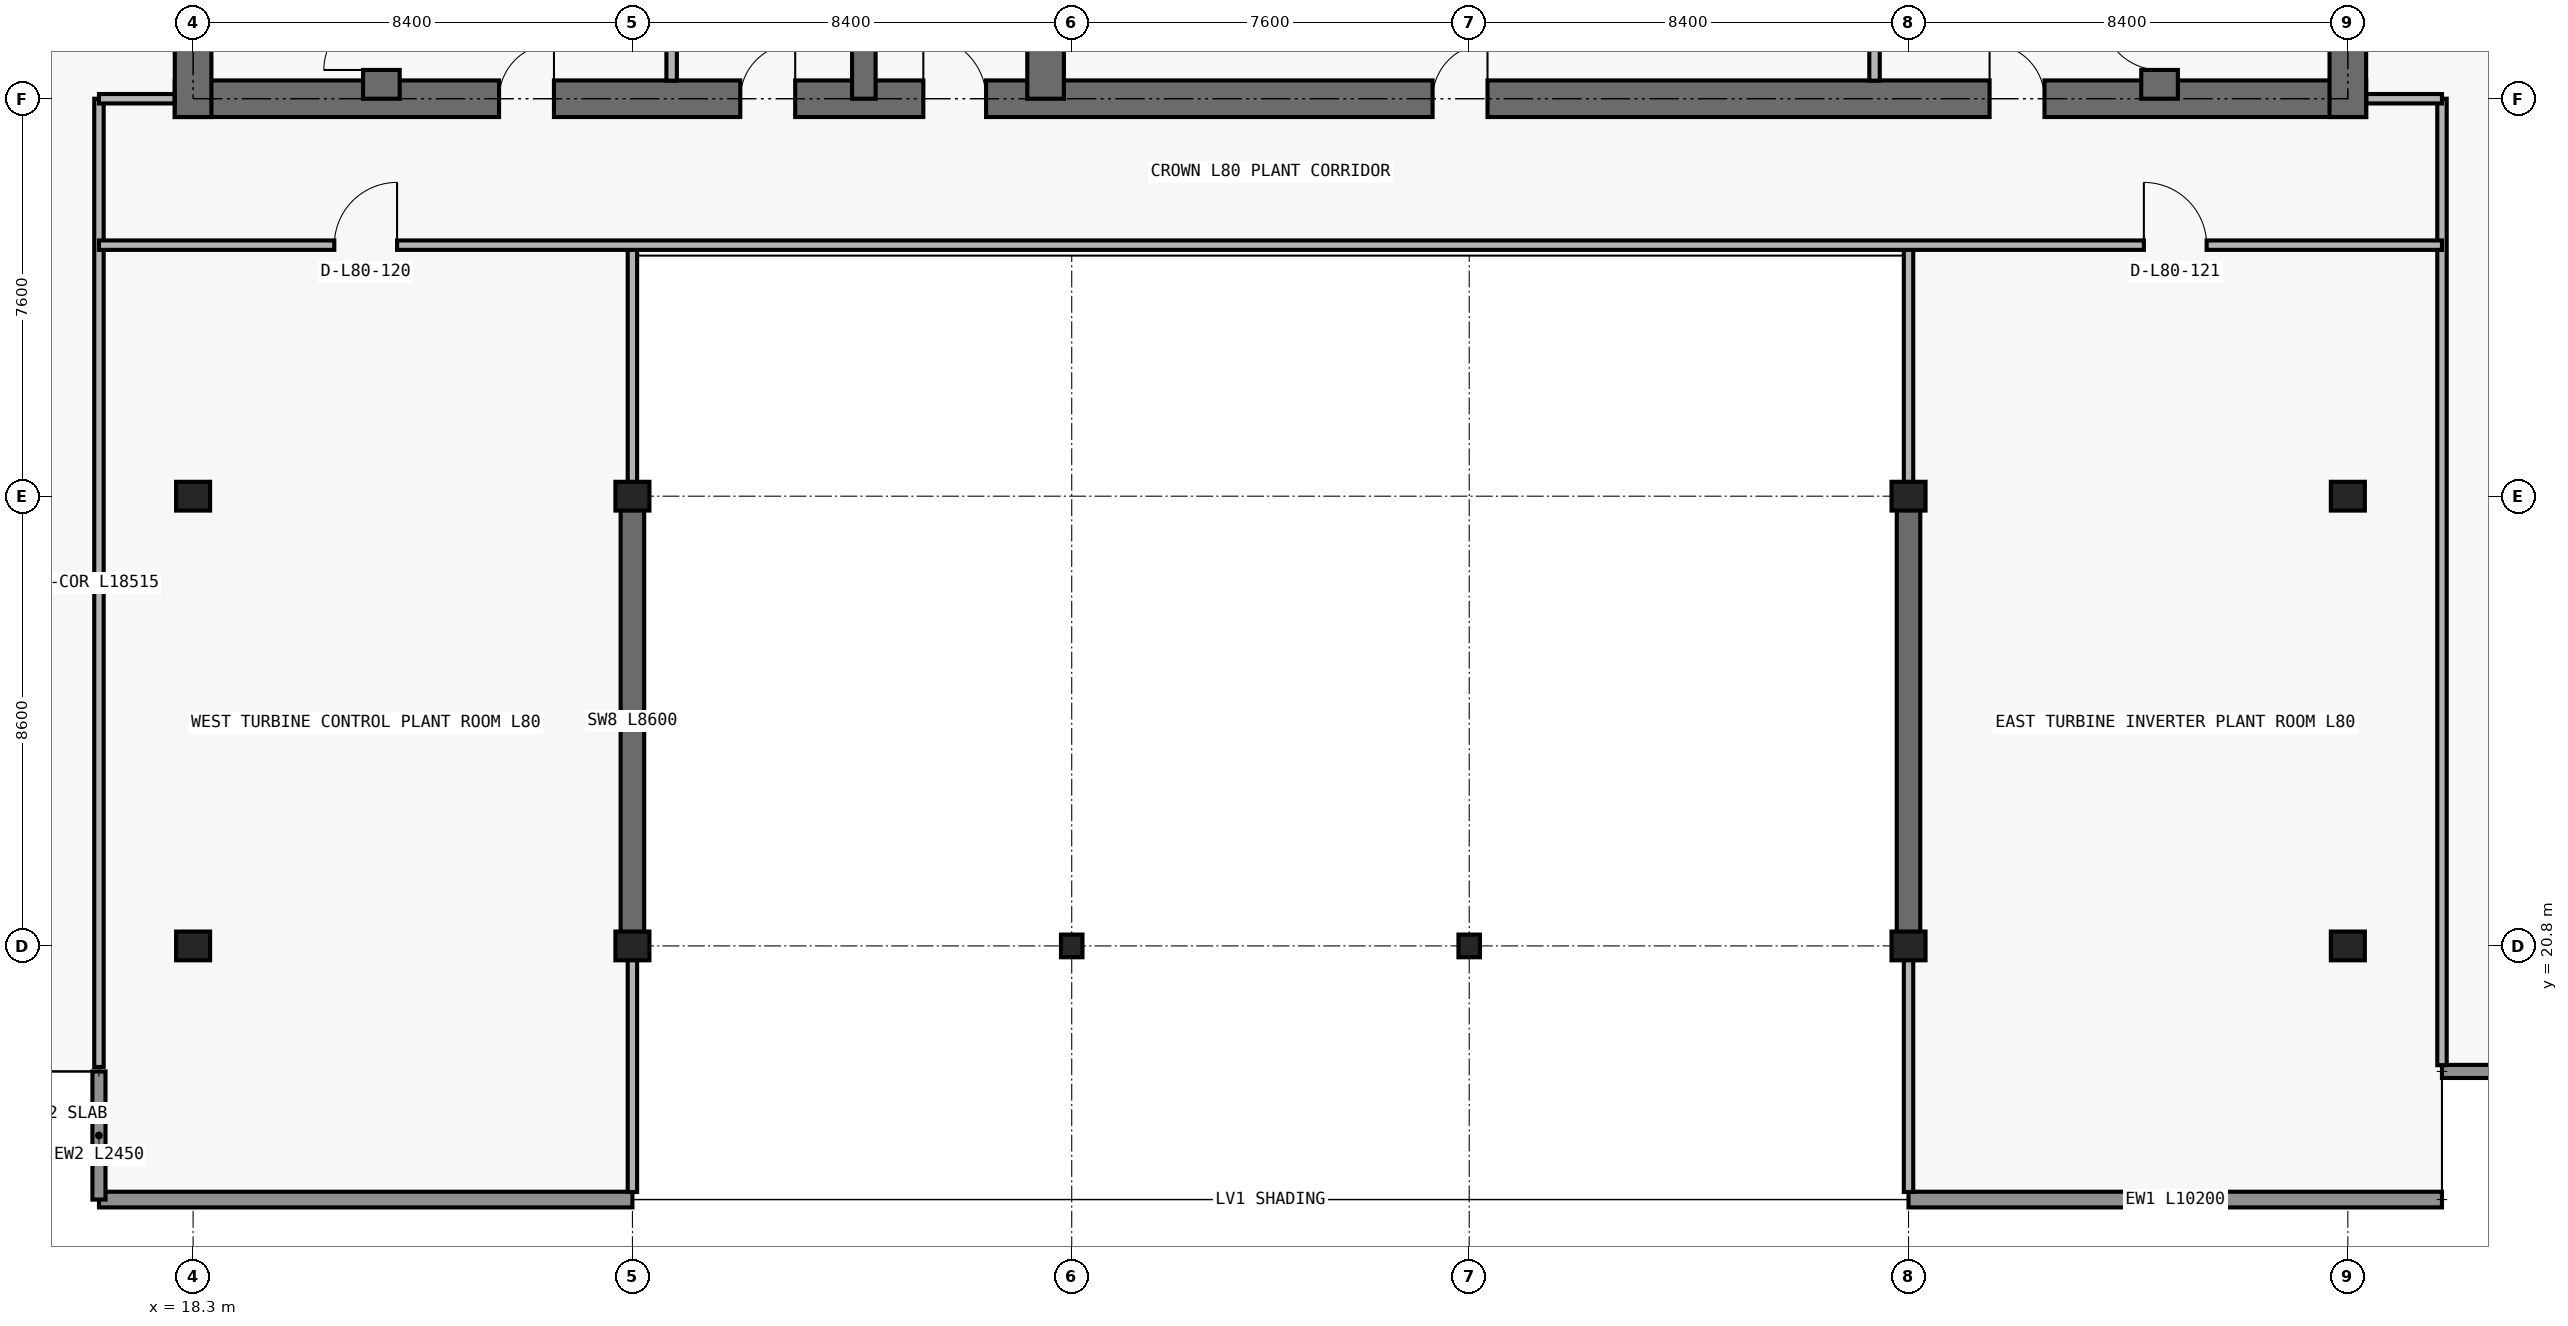
"""IFC4 building model, lengths in metres.
Left out: names, types, materials, properties, quantities, classifications, styles, units other than length and angle.
Written with IfcOpenShell. Run it as: python <this file> out.ifc"""

import sys

from ifc_helpers import new_model, si_unit, direction, frame, frame_2d, origin, origin_2d, place, context, subcontext, project, spatial, rectangle, i_section, extrude, element, fill, save


model = new_model("IFC4")
c1 = context("Model", 3, precision=1e-05, world=origin(), true_north=direction((0.0, 1.0)))
c2 = subcontext(c1, "Body", "Model", "MODEL_VIEW")
j1 = project(units=[si_unit("LENGTHUNIT", "METRE"), si_unit("PLANEANGLEUNIT", "RADIAN")], contexts=[c1])
p1 = place(None, origin())
s1 = spatial("IfcSite", under=j1, at=p1, CompositionType="ELEMENT")
p2 = place(p1, origin())
s2 = spatial("IfcBuilding", under=s1, at=p2, CompositionType="ELEMENT")
p3 = place(p2, frame((0.0, 0.0, 290.2)))
s3 = spatial("IfcBuildingStorey", under=s2, at=p3, CompositionType="ELEMENT", Elevation=290.2)
for number, where, z_axis, x_axis in (
    (1, (18.3, 20.8, 0.0), (0.0, 0.0, 1.0), (1.0, 0.0, 0.0)),
    (2, (26.7, 20.8, 0.0), (0.0, 0.0, 1.0), (1.0, 0.0, 0.0)),
    (3, (51.1, 20.8, 0.0), (0.0, 0.0, 1.0), (1.0, 0.0, 0.0)),
    (4, (59.5, 20.8, 0.0), (0.0, 0.0, 1.0), (1.0, 0.0, 0.0)),
    (5, (18.3, 29.4, 0.0), (0.0, 0.0, 1.0), (1.0, 0.0, 0.0)),
    (6, (26.7, 29.4, 0.0), (0.0, 0.0, 1.0), (1.0, 0.0, 0.0)),
    (7, (51.1, 29.4, 0.0), (0.0, 0.0, 1.0), (1.0, 0.0, 0.0)),
    (8, (59.5, 29.4, 0.0), (0.0, 0.0, 1.0), (1.0, 0.0, 0.0)),
):
    element("IfcColumn", number, at=place(p3, frame(where, z_axis=z_axis, x_axis=x_axis)), inside=s3, PredefinedType="COLUMN", context=c2, shape_type="SweptSolid", body=[
        extrude(rectangle(XDim=0.65, YDim=0.55, at=origin_2d()), origin(), (0.0, 0.0, 1.0), 5.1),
    ])
for number, where, z_axis, x_axis in (
    (9, (35.1, 20.8, 0.0), (0.0, 0.0, 1.0), (1.0, 0.0, 0.0)),
    (10, (42.7, 20.8, 0.0), (0.0, 0.0, 1.0), (1.0, 0.0, 0.0)),
):
    element("IfcColumn", number, at=place(p3, frame(where, z_axis=z_axis, x_axis=x_axis)), inside=s3, PredefinedType="COLUMN", context=c2, shape_type="SweptSolid", body=[
        extrude(i_section(OverallWidth=0.411, OverallDepth=0.434, WebThickness=0.036, FlangeThickness=0.057, FilletRadius=0.015, at=origin_2d()), origin(), (0.0, 0.0, 1.0), 5.1),
    ])
p4 = place(p3, frame((17.95, 37.0, 0.0), z_axis=(0.0, 0.0, 1.0), x_axis=(1.0, 0.0, 0.0)))
e11 = element("IfcWall", 11, at=p4, inside=s3, PredefinedType="SHEAR", context=c2, shape_type="SweptSolid", body=[
    extrude(rectangle(XDim=41.9, YDim=0.7, at=frame_2d((20.95, 0.0))), origin(), (0.0, 0.0, 1.0), 5.1),
])
p5 = place(p4, frame((14.312, 0.0, 0.0)))
e12 = element("IfcOpeningElement", 12, at=p5, cuts=e11, PredefinedType="OPENING", context=c2, shape_type="SweptSolid", body=[
    extrude(rectangle(XDim=1.2, YDim=2.2, at=frame_2d((0.6, 1.1))), frame((0.0, 0.36, 0.0), z_axis=(0.0, -1.0, 0.0), x_axis=(1.0, 0.0, 0.0)), (0.0, 0.0, 1.0), 0.72),
])
p6 = place(p4, frame((6.2, 0.0, 0.0)))
e13 = element("IfcOpeningElement", 13, at=p6, cuts=e11, PredefinedType="OPENING", context=c2, shape_type="SweptSolid", body=[
    extrude(rectangle(XDim=1.05, YDim=2.15, at=frame_2d((0.525, 1.075))), frame((0.0, 0.36, 0.0), z_axis=(0.0, -1.0, 0.0), x_axis=(1.0, 0.0, 0.0)), (0.0, 0.0, 1.0), 0.72),
])
p7 = place(p4, frame((34.7, 0.0, 0.0)))
e14 = element("IfcOpeningElement", 14, at=p7, cuts=e11, PredefinedType="OPENING", context=c2, shape_type="SweptSolid", body=[
    extrude(rectangle(XDim=1.05, YDim=2.15, at=frame_2d((0.525, 1.075))), frame((0.0, 0.36, 0.0), z_axis=(0.0, -1.0, 0.0), x_axis=(1.0, 0.0, 0.0)), (0.0, 0.0, 1.0), 0.72),
])
p8 = place(p4, frame((10.812, 0.0, 0.0)))
e15 = element("IfcOpeningElement", 15, at=p8, cuts=e11, PredefinedType="OPENING", context=c2, shape_type="SweptSolid", body=[
    extrude(rectangle(XDim=1.05, YDim=2.15, at=frame_2d((0.525, 1.075))), frame((0.0, 0.36, 0.0), z_axis=(0.0, -1.0, 0.0), x_axis=(1.0, 0.0, 0.0)), (0.0, 0.0, 1.0), 0.72),
])
p9 = place(p4, frame((24.05, 0.0, 0.0)))
e16 = element("IfcOpeningElement", 16, at=p9, cuts=e11, PredefinedType="OPENING", context=c2, shape_type="SweptSolid", body=[
    extrude(rectangle(XDim=1.05, YDim=2.15, at=frame_2d((0.525, 1.075))), frame((0.0, 0.36, 0.0), z_axis=(0.0, -1.0, 0.0), x_axis=(1.0, 0.0, 0.0)), (0.0, 0.0, 1.0), 0.72),
])
for number, where, z_axis, x_axis in (
    (17, (18.3, 36.65, 0.0), (0.0, 0.0, 1.0), (0.0, 1.0, 0.0)),
    (18, (59.5, 36.65, 0.0), (0.0, 0.0, 1.0), (0.0, 1.0, 0.0)),
):
    element("IfcWall", number, at=place(p3, frame(where, z_axis=z_axis, x_axis=x_axis)), inside=s3, PredefinedType="SHEAR", context=c2, shape_type="SweptSolid", body=[
        extrude(rectangle(XDim=13.95, YDim=0.7, at=frame_2d((6.975, 0.0))), origin(), (0.0, 0.0, 1.0), 5.1),
    ])
p10 = place(p3, frame((21.9, 37.0, 0.0), z_axis=(0.0, 0.0, 1.0), x_axis=(0.0, 1.0, 0.0)))
e19 = element("IfcWall", 19, at=p10, inside=s3, PredefinedType="SHEAR", context=c2, shape_type="SweptSolid", body=[
    extrude(rectangle(XDim=9.575, YDim=0.7, at=frame_2d((4.788, 0.0))), origin(), (0.0, 0.0, 1.0), 5.1),
])
p11 = place(p10, frame((0.55, 0.0, 0.0)))
e20 = element("IfcOpeningElement", 20, at=p11, cuts=e19, PredefinedType="OPENING", context=c2, shape_type="SweptSolid", body=[
    extrude(rectangle(XDim=1.1, YDim=2.15, at=frame_2d((0.55, 1.075))), frame((0.0, 0.36, 0.0), z_axis=(0.0, -1.0, 0.0), x_axis=(1.0, 0.0, 0.0)), (0.0, 0.0, 1.0), 0.72),
])
p12 = place(p3, frame((55.9, 37.0, 0.0), z_axis=(0.0, 0.0, 1.0), x_axis=(0.0, 1.0, 0.0)))
e21 = element("IfcWall", 21, at=p12, inside=s3, PredefinedType="SHEAR", context=c2, shape_type="SweptSolid", body=[
    extrude(rectangle(XDim=9.575, YDim=0.7, at=frame_2d((4.788, 0.0))), origin(), (0.0, 0.0, 1.0), 5.1),
])
p13 = place(p12, frame((0.55, 0.0, 0.0)))
e22 = element("IfcOpeningElement", 22, at=p13, cuts=e21, PredefinedType="OPENING", context=c2, shape_type="SweptSolid", body=[
    extrude(rectangle(XDim=1.1, YDim=2.15, at=frame_2d((0.55, 1.075))), frame((0.0, 0.36, 0.0), z_axis=(0.0, -1.0, 0.0), x_axis=(1.0, 0.0, 0.0)), (0.0, 0.0, 1.0), 0.72),
])
p14 = place(p3, frame((31.125, 37.0, 0.0), z_axis=(0.0, 0.0, 1.0), x_axis=(0.0, 1.0, 0.0)))
e23 = element("IfcWall", 23, at=p14, inside=s3, PredefinedType="SHEAR", context=c2, shape_type="SweptSolid", body=[
    extrude(rectangle(XDim=9.575, YDim=0.45, at=frame_2d((4.788, 0.0))), origin(), (0.0, 0.0, 1.0), 5.1),
])
p15 = place(p3, frame((34.6, 37.0, 0.0), z_axis=(0.0, 0.0, 1.0), x_axis=(0.0, 1.0, 0.0)))
e24 = element("IfcWall", 24, at=p15, inside=s3, PredefinedType="SHEAR", context=c2, shape_type="SweptSolid", body=[
    extrude(rectangle(XDim=9.575, YDim=0.7, at=frame_2d((4.788, 0.0))), origin(), (0.0, 0.0, 1.0), 5.1),
])
for number, where, z_axis, x_axis in (
    (25, (26.7, 20.8, 0.0), (0.0, 0.0, 1.0), (0.0, 1.0, 0.0)),
    (26, (51.1, 20.8, 0.0), (0.0, 0.0, 1.0), (0.0, 1.0, 0.0)),
):
    element("IfcWall", number, at=place(p3, frame(where, z_axis=z_axis, x_axis=x_axis)), inside=s3, PredefinedType="SHEAR", context=c2, shape_type="SweptSolid", body=[
        extrude(rectangle(XDim=8.6, YDim=0.45, at=frame_2d((4.3, 0.0))), origin(), (0.0, 0.0, 1.0), 5.1),
    ])
for number, where, z_axis, x_axis in (
    (27, (61.3, 15.95, 0.0), (0.0, 0.0, 1.0), (-1.0, 0.0, 0.0)),
    (28, (26.7, 15.95, 0.0), (0.0, 0.0, 1.0), (-1.0, 0.0, 0.0)),
):
    element("IfcWall", number, at=place(p3, frame(where, z_axis=z_axis, x_axis=x_axis)), inside=s3, PredefinedType="STANDARD", context=c2, shape_type="SweptSolid", body=[
        extrude(rectangle(XDim=10.2, YDim=0.3, at=frame_2d((5.1, 0.0))), origin(), (0.0, 0.0, 1.0), 5.1),
    ])
p16 = place(p3, frame((16.5, 18.4, 0.0), z_axis=(0.0, 0.0, 1.0), x_axis=(0.0, -1.0, 0.0)))
e29 = element("IfcWall", 29, at=p16, inside=s3, PredefinedType="ELEMENTEDWALL", context=c2, shape_type="SweptSolid", body=[
    extrude(rectangle(XDim=2.45, YDim=0.25, at=frame_2d((1.225, 0.0))), origin(), (0.0, 0.0, 1.0), 5.1),
])
p17 = place(p3, frame((61.3, 18.4, 0.0), z_axis=(0.0, 0.0, 1.0), x_axis=(1.0, 0.0, 0.0)))
e30 = element("IfcWall", 30, at=p17, inside=s3, PredefinedType="ELEMENTEDWALL", context=c2, shape_type="SweptSolid", body=[
    extrude(rectangle(XDim=2.65, YDim=0.25, at=frame_2d((1.325, 0.0))), origin(), (0.0, 0.0, 1.0), 5.1),
])
p18 = place(p3, frame((16.5, 18.485, 0.0), z_axis=(0.0, 0.0, 1.0), x_axis=(0.0, 1.0, 0.0)))
e31 = element("IfcWall", 31, at=p18, inside=s3, PredefinedType="PARTITIONING", context=c2, shape_type="SweptSolid", body=[
    extrude(rectangle(XDim=18.515, YDim=0.18, at=frame_2d((9.257, 0.0))), origin(), (0.0, 0.0, 1.0), 5.1),
])
p19 = place(p3, frame((26.7, 16.095, 0.0), z_axis=(0.0, 0.0, 1.0), x_axis=(0.0, 1.0, 0.0)))
e32 = element("IfcWall", 32, at=p19, inside=s3, PredefinedType="PARTITIONING", context=c2, shape_type="SweptSolid", body=[
    extrude(rectangle(XDim=4.7, YDim=0.18, at=frame_2d((2.35, 0.0))), origin(), (0.0, 0.0, 1.0), 5.1),
])
p20 = place(p3, frame((26.7, 29.405, 0.0), z_axis=(0.0, 0.0, 1.0), x_axis=(0.0, 1.0, 0.0)))
e33 = element("IfcWall", 33, at=p20, inside=s3, PredefinedType="PARTITIONING", context=c2, shape_type="SweptSolid", body=[
    extrude(rectangle(XDim=4.795, YDim=0.18, at=frame_2d((2.397, 0.0))), origin(), (0.0, 0.0, 1.0), 4.385),
])
for number, where, z_axis, x_axis in (
    (34, (27.45, 37.345, 0.0), (0.0, 0.0, 1.0), (0.0, 1.0, 0.0)),
    (35, (50.45, 37.345, 0.0), (0.0, 0.0, 1.0), (0.0, 1.0, 0.0)),
):
    element("IfcWall", number, at=place(p3, frame(where, z_axis=z_axis, x_axis=x_axis)), inside=s3, PredefinedType="PARTITIONING", context=c2, shape_type="SweptSolid", body=[
        extrude(rectangle(XDim=5.385, YDim=0.2, at=frame_2d((2.692, 0.0))), origin(), (0.0, 0.0, 1.0), 5.1),
    ])
p21 = place(p3, frame((51.1, 16.095, 0.0), z_axis=(0.0, 0.0, 1.0), x_axis=(0.0, 1.0, 0.0)))
e36 = element("IfcWall", 36, at=p21, inside=s3, PredefinedType="PARTITIONING", context=c2, shape_type="SweptSolid", body=[
    extrude(rectangle(XDim=4.7, YDim=0.18, at=frame_2d((2.35, 0.0))), origin(), (0.0, 0.0, 1.0), 5.1),
])
p22 = place(p3, frame((51.1, 29.405, 0.0), z_axis=(0.0, 0.0, 1.0), x_axis=(0.0, 1.0, 0.0)))
e37 = element("IfcWall", 37, at=p22, inside=s3, PredefinedType="PARTITIONING", context=c2, shape_type="SweptSolid", body=[
    extrude(rectangle(XDim=4.795, YDim=0.18, at=frame_2d((2.397, 0.0))), origin(), (0.0, 0.0, 1.0), 4.385),
])
p23 = place(p3, frame((61.3, 18.52, 0.0), z_axis=(0.0, 0.0, 1.0), x_axis=(0.0, 1.0, 0.0)))
e38 = element("IfcWall", 38, at=p23, inside=s3, PredefinedType="PARTITIONING", context=c2, shape_type="SweptSolid", body=[
    extrude(rectangle(XDim=18.48, YDim=0.18, at=frame_2d((9.24, 0.0))), origin(), (0.0, 0.0, 1.0), 5.1),
])
p24 = place(p3, frame((16.5, 34.2, 0.0), z_axis=(0.0, 0.0, 1.0), x_axis=(1.0, 0.0, 0.0)))
e39 = element("IfcWall", 39, at=p24, inside=s3, PredefinedType="PARTITIONING", context=c2, shape_type="SweptSolid", body=[
    extrude(rectangle(XDim=44.8, YDim=0.18, at=frame_2d((22.4, 0.0))), origin(), (0.0, 0.0, 1.0), 5.1),
])
p25 = place(p24, frame((4.5, 0.0, 0.0)))
e40 = element("IfcOpeningElement", 40, at=p25, cuts=e39, PredefinedType="OPENING", context=c2, shape_type="SweptSolid", body=[
    extrude(rectangle(XDim=1.2, YDim=2.2, at=frame_2d((0.6, 1.1))), frame((0.0, 0.1, 0.0), z_axis=(0.0, -1.0, 0.0), x_axis=(1.0, 0.0, 0.0)), (0.0, 0.0, 1.0), 0.2),
])
p26 = place(p24, frame((39.1, 0.0, 0.0)))
e41 = element("IfcOpeningElement", 41, at=p26, cuts=e39, PredefinedType="OPENING", context=c2, shape_type="SweptSolid", body=[
    extrude(rectangle(XDim=1.2, YDim=2.2, at=frame_2d((0.6, 1.1))), frame((0.0, 0.1, 0.0), z_axis=(0.0, -1.0, 0.0), x_axis=(1.0, 0.0, 0.0)), (0.0, 0.0, 1.0), 0.2),
])
for number, where, z_axis, x_axis in (
    (42, (16.5, 37.0, 0.0), (0.0, 0.0, 1.0), (1.0, 0.0, 0.0)),
    (43, (59.855, 37.0, 0.0), (0.0, 0.0, 1.0), (1.0, 0.0, 0.0)),
):
    element("IfcWall", number, at=place(p3, frame(where, z_axis=z_axis, x_axis=x_axis)), inside=s3, PredefinedType="PARTITIONING", context=c2, shape_type="SweptSolid", body=[
        extrude(rectangle(XDim=1.445, YDim=0.18, at=frame_2d((0.723, 0.0))), origin(), (0.0, 0.0, 1.0), 5.1),
    ])
p27 = place(p5, origin())
e44 = element("IfcDoor", 44, at=p27, inside=s3, OperationType="SINGLE_SWING_LEFT", PredefinedType="DOOR", context=c2, shape_type="SweptSolid", body=[
    extrude(rectangle(XDim=1.2, YDim=2.2, at=frame_2d((0.6, 1.1))), frame((0.0, 0.025, 0.0), z_axis=(0.0, -1.0, 0.0), x_axis=(1.0, 0.0, 0.0)), (0.0, 0.0, 1.0), 0.05),
])
fill(e12, e44)
p28 = place(p6, origin())
e45 = element("IfcDoor", 45, at=p28, inside=s3, OperationType="SINGLE_SWING_RIGHT", PredefinedType="DOOR", context=c2, shape_type="SweptSolid", body=[
    extrude(rectangle(XDim=1.05, YDim=2.15, at=frame_2d((0.525, 1.075))), frame((0.0, 0.025, 0.0), z_axis=(0.0, -1.0, 0.0), x_axis=(1.0, 0.0, 0.0)), (0.0, 0.0, 1.0), 0.05),
])
fill(e13, e45)
p29 = place(p11, origin())
e46 = element("IfcDoor", 46, at=p29, inside=s3, OperationType="SINGLE_SWING_LEFT", PredefinedType="DOOR", context=c2, shape_type="SweptSolid", body=[
    extrude(rectangle(XDim=1.1, YDim=2.15, at=frame_2d((0.55, 1.075))), frame((0.0, 0.025, 0.0), z_axis=(0.0, -1.0, 0.0), x_axis=(1.0, 0.0, 0.0)), (0.0, 0.0, 1.0), 0.05),
])
fill(e20, e46)
p30 = place(p7, origin())
e47 = element("IfcDoor", 47, at=p30, inside=s3, OperationType="SINGLE_SWING_LEFT", PredefinedType="DOOR", context=c2, shape_type="SweptSolid", body=[
    extrude(rectangle(XDim=1.05, YDim=2.15, at=frame_2d((0.525, 1.075))), frame((0.0, 0.025, 0.0), z_axis=(0.0, -1.0, 0.0), x_axis=(1.0, 0.0, 0.0)), (0.0, 0.0, 1.0), 0.05),
])
fill(e14, e47)
p31 = place(p13, origin())
e48 = element("IfcDoor", 48, at=p31, inside=s3, OperationType="SINGLE_SWING_RIGHT", PredefinedType="DOOR", context=c2, shape_type="SweptSolid", body=[
    extrude(rectangle(XDim=1.1, YDim=2.15, at=frame_2d((0.55, 1.075))), frame((0.0, 0.025, 0.0), z_axis=(0.0, -1.0, 0.0), x_axis=(1.0, 0.0, 0.0)), (0.0, 0.0, 1.0), 0.05),
])
fill(e22, e48)
p32 = place(p8, origin())
e49 = element("IfcDoor", 49, at=p32, inside=s3, OperationType="SINGLE_SWING_RIGHT", PredefinedType="DOOR", context=c2, shape_type="SweptSolid", body=[
    extrude(rectangle(XDim=1.05, YDim=2.15, at=frame_2d((0.525, 1.075))), frame((0.0, 0.025, 0.0), z_axis=(0.0, -1.0, 0.0), x_axis=(1.0, 0.0, 0.0)), (0.0, 0.0, 1.0), 0.05),
])
fill(e15, e49)
p33 = place(p9, origin())
e50 = element("IfcDoor", 50, at=p33, inside=s3, OperationType="SINGLE_SWING_RIGHT", PredefinedType="DOOR", context=c2, shape_type="SweptSolid", body=[
    extrude(rectangle(XDim=1.05, YDim=2.15, at=frame_2d((0.525, 1.075))), frame((0.0, 0.025, 0.0), z_axis=(0.0, -1.0, 0.0), x_axis=(1.0, 0.0, 0.0)), (0.0, 0.0, 1.0), 0.05),
])
fill(e16, e50)
p34 = place(p25, origin())
e51 = element("IfcDoor", 51, at=p34, inside=s3, OperationType="SINGLE_SWING_RIGHT", PredefinedType="DOOR", context=c2, shape_type="SweptSolid", body=[
    extrude(rectangle(XDim=1.2, YDim=2.2, at=frame_2d((0.6, 1.1))), frame((0.0, 0.025, 0.0), z_axis=(0.0, -1.0, 0.0), x_axis=(1.0, 0.0, 0.0)), (0.0, 0.0, 1.0), 0.05),
])
fill(e40, e51)
p35 = place(p26, origin())
e52 = element("IfcDoor", 52, at=p35, inside=s3, OperationType="SINGLE_SWING_LEFT", PredefinedType="DOOR", context=c2, shape_type="SweptSolid", body=[
    extrude(rectangle(XDim=1.2, YDim=2.2, at=frame_2d((0.6, 1.1))), frame((0.0, 0.025, 0.0), z_axis=(0.0, -1.0, 0.0), x_axis=(1.0, 0.0, 0.0)), (0.0, 0.0, 1.0), 0.05),
])
fill(e41, e52)
save(model, sys.argv[1])
